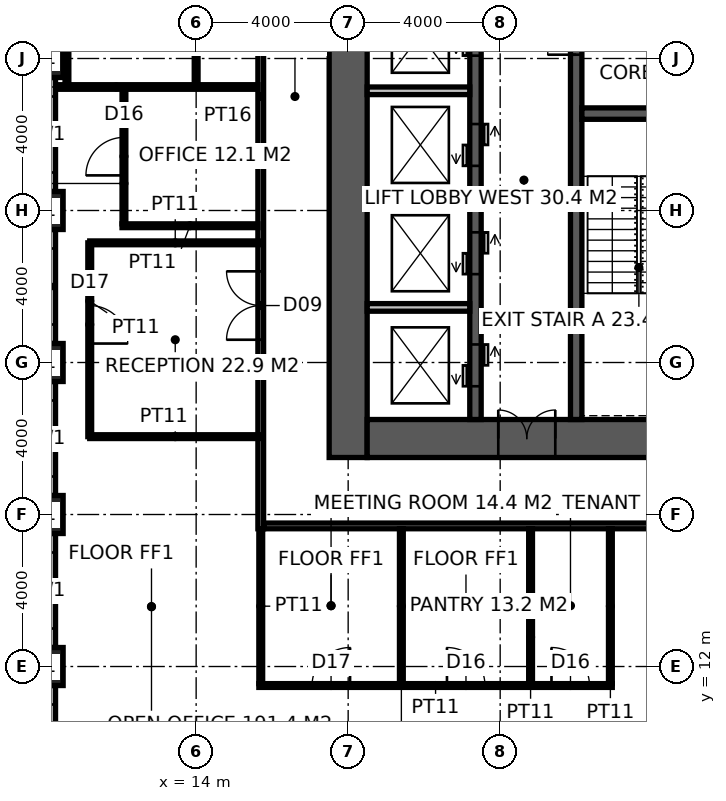
"""IFC4 building model, lengths in metres.
Left out: names, types, materials, properties, quantities, classifications, styles, units other than length and angle.
Written with IfcOpenShell. Run it as: python <this file> out.ifc"""

import sys

from ifc_helpers import new_model, si_unit, direction, frame, frame_2d, origin, origin_2d, place, context, subcontext, project, spatial, rectangle, hollow_rectangle, extrude, element, fill, save


model = new_model("IFC4")
c1 = context("Model", 3, precision=1e-05, world=origin(), true_north=direction((0.0, 1.0)))
c2 = subcontext(c1, "Body", "Model", "MODEL_VIEW")
j1 = project(units=[si_unit("LENGTHUNIT", "METRE"), si_unit("PLANEANGLEUNIT", "RADIAN")], contexts=[c1])
p1 = place(None, origin())
s1 = spatial("IfcSite", under=j1, at=p1, CompositionType="ELEMENT")
p2 = place(p1, origin())
s2 = spatial("IfcBuilding", under=s1, at=p2, CompositionType="ELEMENT")
p3 = place(p2, frame((0.0, 0.0, 121.4)))
s3 = spatial("IfcBuildingStorey", under=s2, at=p3, CompositionType="ELEMENT", Elevation=121.4)
for number, where, z_axis, x_axis in (
    (1, (10.0, 12.0, 0.0), (0.0, 0.0, 1.0), (1.0, 0.0, 0.0)),
    (2, (10.0, 16.0, 0.0), (0.0, 0.0, 1.0), (1.0, 0.0, 0.0)),
    (3, (10.0, 20.0, 0.0), (0.0, 0.0, 1.0), (1.0, 0.0, 0.0)),
    (4, (10.0, 24.0, 0.0), (0.0, 0.0, 1.0), (1.0, 0.0, 0.0)),
    (5, (10.0, 28.0, 0.0), (0.0, 0.0, 1.0), (1.0, 0.0, 0.0)),
):
    element("IfcColumn", number, at=place(p3, frame(where, z_axis=z_axis, x_axis=x_axis)), inside=s3, PredefinedType="COLUMN", context=c2, shape_type="SweptSolid", body=[
        extrude(hollow_rectangle(XDim=1.0, YDim=1.0, WallThickness=0.1, at=origin_2d()), origin(), (0.0, 0.0, 1.0), 4.0),
    ])
p4 = place(p3, frame((18.0, 17.5, -0.15), z_axis=(0.0, 0.0, 1.0), x_axis=(0.0, 1.0, 0.0)))
e6 = element("IfcWall", 6, at=p4, inside=s3, PredefinedType="SHEAR", context=c2, shape_type="SweptSolid", body=[
    extrude(rectangle(XDim=19.0, YDim=1.0, at=frame_2d((9.5, 0.0))), origin(), (0.0, 0.0, 1.0), 4.0),
])
p5 = place(p3, frame((18.5, 18.0, -0.15), z_axis=(0.0, 0.0, 1.0), x_axis=(1.0, 0.0, 0.0)))
e7 = element("IfcWall", 7, at=p5, inside=s3, PredefinedType="SHEAR", context=c2, shape_type="SweptSolid", body=[
    extrude(rectangle(XDim=17.6, YDim=1.0, at=frame_2d((8.8, 0.0))), origin(), (0.0, 0.0, 1.0), 4.0),
])
p6 = place(p5, frame((3.45, 0.0, 0.15)))
e8 = element("IfcOpeningElement", 8, at=p6, cuts=e7, PredefinedType="OPENING", context=c2, shape_type="SweptSolid", body=[
    extrude(rectangle(XDim=1.5, YDim=2.4, at=frame_2d((0.75, 1.2))), frame((0.0, 0.51, 0.0), z_axis=(0.0, -1.0, 0.0), x_axis=(1.0, 0.0, 0.0)), (0.0, 0.0, 1.0), 1.02),
])
p7 = place(p3, frame((24.0, 18.5, -0.15), z_axis=(0.0, 0.0, 1.0), x_axis=(0.0, 1.0, 0.0)))
e9 = element("IfcWall", 9, at=p7, inside=s3, PredefinedType="SHEAR", context=c2, shape_type="SweptSolid", body=[
    extrude(rectangle(XDim=17.0, YDim=0.3, at=frame_2d((8.5, 0.0))), origin(), (0.0, 0.0, 1.0), 4.0),
])
p8 = place(p7, frame((9.6, 0.0, 0.15)))
e10 = element("IfcOpeningElement", 10, at=p8, cuts=e9, PredefinedType="OPENING", context=c2, shape_type="SweptSolid", body=[
    extrude(rectangle(XDim=1.5, YDim=2.4, at=frame_2d((0.75, 1.2))), frame((0.0, 0.16, 0.0), z_axis=(0.0, -1.0, 0.0), x_axis=(1.0, 0.0, 0.0)), (0.0, 0.0, 1.0), 0.32),
])
p9 = place(p3, frame((24.15, 26.55, -0.15), z_axis=(0.0, 0.0, 1.0), x_axis=(1.0, 0.0, 0.0)))
e11 = element("IfcWall", 11, at=p9, inside=s3, PredefinedType="SHEAR", context=c2, shape_type="SweptSolid", body=[
    extrude(rectangle(XDim=11.25, YDim=0.3, at=frame_2d((5.625, 0.0))), origin(), (0.0, 0.0, 1.0), 4.0),
])
p10 = place(p9, frame((9.25, 0.0, 0.15)))
e12 = element("IfcOpeningElement", 12, at=p10, cuts=e11, PredefinedType="OPENING", context=c2, shape_type="SweptSolid", body=[
    extrude(rectangle(XDim=1.0, YDim=2.2, at=frame_2d((0.5, 1.1))), frame((0.0, 0.16, 0.0), z_axis=(0.0, -1.0, 0.0), x_axis=(1.0, 0.0, 0.0)), (0.0, 0.0, 1.0), 0.32),
])
p11 = place(p9, frame((4.9, 0.0, 0.15)))
e13 = element("IfcOpeningElement", 13, at=p11, cuts=e11, PredefinedType="OPENING", context=c2, shape_type="SweptSolid", body=[
    extrude(rectangle(XDim=1.5, YDim=2.4, at=frame_2d((0.75, 1.2))), frame((0.0, 0.16, 0.0), z_axis=(0.0, -1.0, 0.0), x_axis=(1.0, 0.0, 0.0)), (0.0, 0.0, 1.0), 0.32),
])
p12 = place(p3, frame((21.35, 18.5, -0.15), z_axis=(0.0, 0.0, 1.0), x_axis=(0.0, 1.0, 0.0)))
e14 = element("IfcWall", 14, at=p12, inside=s3, PredefinedType="SHEAR", context=c2, shape_type="SweptSolid", body=[
    extrude(rectangle(XDim=12.5, YDim=0.3, at=frame_2d((6.25, 0.0))), origin(), (0.0, 0.0, 1.0), 4.0),
])
p13 = place(p12, frame((0.875, 0.0, 0.15)))
e15 = element("IfcOpeningElement", 15, at=p13, cuts=e14, PredefinedType="OPENING", context=c2, shape_type="SweptSolid", body=[
    extrude(rectangle(XDim=1.1, YDim=2.2, at=frame_2d((0.55, 1.1))), frame((0.0, 0.16, 0.0), z_axis=(0.0, -1.0, 0.0), x_axis=(1.0, 0.0, 0.0)), (0.0, 0.0, 1.0), 0.32),
])
p14 = place(p12, frame((3.825, 0.0, 0.15)))
e16 = element("IfcOpeningElement", 16, at=p14, cuts=e14, PredefinedType="OPENING", context=c2, shape_type="SweptSolid", body=[
    extrude(rectangle(XDim=1.1, YDim=2.2, at=frame_2d((0.55, 1.1))), frame((0.0, 0.16, 0.0), z_axis=(0.0, -1.0, 0.0), x_axis=(1.0, 0.0, 0.0)), (0.0, 0.0, 1.0), 0.32),
])
p15 = place(p12, frame((6.675, 0.0, 0.15)))
e17 = element("IfcOpeningElement", 17, at=p15, cuts=e14, PredefinedType="OPENING", context=c2, shape_type="SweptSolid", body=[
    extrude(rectangle(XDim=1.1, YDim=2.2, at=frame_2d((0.55, 1.1))), frame((0.0, 0.16, 0.0), z_axis=(0.0, -1.0, 0.0), x_axis=(1.0, 0.0, 0.0)), (0.0, 0.0, 1.0), 0.32),
])
p16 = place(p12, frame((9.575, 0.0, 0.15)))
e18 = element("IfcOpeningElement", 18, at=p16, cuts=e14, PredefinedType="OPENING", context=c2, shape_type="SweptSolid", body=[
    extrude(rectangle(XDim=1.1, YDim=2.2, at=frame_2d((0.55, 1.1))), frame((0.0, 0.16, 0.0), z_axis=(0.0, -1.0, 0.0), x_axis=(1.0, 0.0, 0.0)), (0.0, 0.0, 1.0), 0.32),
])
for number, where, z_axis, x_axis in (
    (19, (18.5, 21.45, -0.15), (0.0, 0.0, 1.0), (1.0, 0.0, 0.0)),
    (20, (18.5, 24.3, -0.15), (0.0, 0.0, 1.0), (1.0, 0.0, 0.0)),
    (21, (18.5, 27.15, -0.15), (0.0, 0.0, 1.0), (1.0, 0.0, 0.0)),
):
    element("IfcWall", number, at=place(p3, frame(where, z_axis=z_axis, x_axis=x_axis)), inside=s3, PredefinedType="SOLIDWALL", context=c2, shape_type="SweptSolid", body=[
        extrude(rectangle(XDim=2.7, YDim=0.2, at=frame_2d((1.35, 0.0))), origin(), (0.0, 0.0, 1.0), 4.0),
    ])
p17 = place(p3, frame((15.7, 15.625, 0.0), z_axis=(0.0, 0.0, 1.0), x_axis=(0.0, 1.0, 0.0)))
e22 = element("IfcWall", 22, at=p17, inside=s3, PredefinedType="PARTITIONING", context=c2, shape_type="SweptSolid", body=[
    extrude(rectangle(XDim=22.75, YDim=0.15, at=frame_2d((11.375, 0.0))), origin(), (0.0, 0.0, 1.0), 3.85),
])
p18 = place(p17, frame((4.974, 0.0, 0.0)))
e23 = element("IfcOpeningElement", 23, at=p18, cuts=e22, PredefinedType="OPENING", context=c2, shape_type="SweptSolid", body=[
    extrude(rectangle(XDim=1.8, YDim=2.4, at=frame_2d((0.9, 1.2))), frame((0.0, 0.085, 0.0), z_axis=(0.0, -1.0, 0.0), x_axis=(1.0, 0.0, 0.0)), (0.0, 0.0, 1.0), 0.17),
])
p19 = place(p17, frame((16.226, 0.0, 0.0)))
e24 = element("IfcOpeningElement", 24, at=p19, cuts=e22, PredefinedType="OPENING", context=c2, shape_type="SweptSolid", body=[
    extrude(rectangle(XDim=1.8, YDim=2.4, at=frame_2d((0.9, 1.2))), frame((0.0, 0.085, 0.0), z_axis=(0.0, -1.0, 0.0), x_axis=(1.0, 0.0, 0.0)), (0.0, 0.0, 1.0), 0.17),
])
p20 = place(p3, frame((15.775, 15.7, 0.0), z_axis=(0.0, 0.0, 1.0), x_axis=(1.0, 0.0, 0.0)))
e25 = element("IfcWall", 25, at=p20, inside=s3, PredefinedType="PARTITIONING", context=c2, shape_type="SweptSolid", body=[
    extrude(rectangle(XDim=22.05, YDim=0.15, at=frame_2d((11.025, 0.0))), origin(), (0.0, 0.0, 1.0), 3.85),
])
p21 = place(p3, frame((10.3, 27.25, 0.0), z_axis=(0.0, 0.0, 1.0), x_axis=(1.0, 0.0, 0.0)))
e26 = element("IfcWall", 26, at=p21, inside=s3, PredefinedType="PARTITIONING", context=c2, shape_type="SweptSolid", body=[
    extrude(rectangle(XDim=5.325, YDim=0.12, at=frame_2d((2.663, 0.0))), origin(), (0.0, 0.0, 1.0), 3.85),
])
p22 = place(p3, frame((15.65, 11.5, 0.0), z_axis=(0.0, 0.0, 1.0), x_axis=(1.0, 0.0, 0.0)))
e27 = element("IfcWall", 27, at=p22, inside=s3, PredefinedType="PARTITIONING", context=c2, shape_type="SweptSolid", body=[
    extrude(rectangle(XDim=9.3, YDim=0.1, at=frame_2d((4.65, 0.0))), origin(), (0.0, 0.0, 1.0), 3.85),
])
p23 = place(p22, frame((1.4, 0.0, 0.0)))
e28 = element("IfcOpeningElement", 28, at=p23, cuts=e27, PredefinedType="OPENING", context=c2, shape_type="SweptSolid", body=[
    extrude(rectangle(XDim=1.0, YDim=2.2, at=frame_2d((0.5, 1.1))), frame((0.0, 0.06, 0.0), z_axis=(0.0, -1.0, 0.0), x_axis=(1.0, 0.0, 0.0)), (0.0, 0.0, 1.0), 0.12),
])
p24 = place(p22, frame((4.95, 0.0, 0.0)))
e29 = element("IfcOpeningElement", 29, at=p24, cuts=e27, PredefinedType="OPENING", context=c2, shape_type="SweptSolid", body=[
    extrude(rectangle(XDim=1.0, YDim=2.2, at=frame_2d((0.5, 1.1))), frame((0.0, 0.06, 0.0), z_axis=(0.0, -1.0, 0.0), x_axis=(1.0, 0.0, 0.0)), (0.0, 0.0, 1.0), 0.12),
])
p25 = place(p22, frame((7.7, 0.0, 0.0)))
e30 = element("IfcOpeningElement", 30, at=p25, cuts=e27, PredefinedType="OPENING", context=c2, shape_type="SweptSolid", body=[
    extrude(rectangle(XDim=1.0, YDim=2.2, at=frame_2d((0.5, 1.1))), frame((0.0, 0.06, 0.0), z_axis=(0.0, -1.0, 0.0), x_axis=(1.0, 0.0, 0.0)), (0.0, 0.0, 1.0), 0.12),
])
p26 = place(p3, frame((12.05, 23.599, 0.0), z_axis=(0.0, 0.0, 1.0), x_axis=(1.0, 0.0, 0.0)))
e31 = element("IfcWall", 31, at=p26, inside=s3, PredefinedType="PARTITIONING", context=c2, shape_type="SweptSolid", body=[
    extrude(rectangle(XDim=3.575, YDim=0.1, at=frame_2d((1.788, 0.0))), origin(), (0.0, 0.0, 1.0), 2.95),
])
p27 = place(p3, frame((10.6, 27.31, 0.0), z_axis=(0.0, 0.0, 1.0), x_axis=(0.0, 1.0, 0.0)))
e32 = element("IfcWall", 32, at=p27, inside=s3, PredefinedType="PARTITIONING", context=c2, shape_type="SweptSolid", body=[
    extrude(rectangle(XDim=3.49, YDim=0.1, at=frame_2d((1.745, 0.0))), origin(), (0.0, 0.0, 1.0), 3.85),
])
p28 = place(p3, frame((12.1, 23.649, 0.0), z_axis=(0.0, 0.0, 1.0), x_axis=(0.0, 1.0, 0.0)))
e33 = element("IfcWall", 33, at=p28, inside=s3, PredefinedType="PARTITIONING", context=c2, shape_type="SweptSolid", body=[
    extrude(rectangle(XDim=3.54, YDim=0.1, at=frame_2d((1.77, 0.0))), origin(), (0.0, 0.0, 1.0), 3.85),
])
p29 = place(p28, frame((1.275, 0.0, 0.0)))
e34 = element("IfcOpeningElement", 34, at=p29, cuts=e33, PredefinedType="OPENING", context=c2, shape_type="SweptSolid", body=[
    extrude(rectangle(XDim=1.0, YDim=2.2, at=frame_2d((0.5, 1.1))), frame((0.0, 0.06, 0.0), z_axis=(0.0, -1.0, 0.0), x_axis=(1.0, 0.0, 0.0)), (0.0, 0.0, 1.0), 0.12),
])
p30 = place(p3, frame((14.0, 27.31, 0.0), z_axis=(0.0, 0.0, 1.0), x_axis=(0.0, 1.0, 0.0)))
e35 = element("IfcWall", 35, at=p30, inside=s3, PredefinedType="PARTITIONING", context=c2, shape_type="SweptSolid", body=[
    extrude(rectangle(XDim=3.49, YDim=0.1, at=frame_2d((1.745, 0.0))), origin(), (0.0, 0.0, 1.0), 3.85),
])
for number, where, z_axis, x_axis in (
    (36, (15.7, 11.55, 0.0), (0.0, 0.0, 1.0), (0.0, 1.0, 0.0)),
    (37, (19.4, 11.55, 0.0), (0.0, 0.0, 1.0), (0.0, 1.0, 0.0)),
    (38, (22.8, 11.55, 0.0), (0.0, 0.0, 1.0), (0.0, 1.0, 0.0)),
    (39, (24.9, 11.55, 0.0), (0.0, 0.0, 1.0), (0.0, 1.0, 0.0)),
):
    element("IfcWall", number, at=place(p3, frame(where, z_axis=z_axis, x_axis=x_axis)), inside=s3, PredefinedType="PARTITIONING", context=c2, shape_type="SweptSolid", body=[
        extrude(rectangle(XDim=4.075, YDim=0.1, at=frame_2d((2.038, 0.0))), origin(), (0.0, 0.0, 1.0), 3.85),
    ])
p31 = place(p3, frame((15.7, 23.149, 0.0), z_axis=(0.0, 0.0, 1.0), x_axis=(-1.0, 0.0, 0.0)))
e40 = element("IfcWall", 40, at=p31, inside=s3, PredefinedType="PARTITIONING", context=c2, shape_type="SweptSolid", body=[
    extrude(rectangle(XDim=4.5, YDim=0.1, at=frame_2d((2.25, 0.0))), origin(), (0.0, 0.0, 1.0), 3.85),
])
p32 = place(p3, frame((11.2, 23.149, 0.0), z_axis=(0.0, 0.0, 1.0), x_axis=(0.0, -1.0, 0.0)))
e41 = element("IfcWall", 41, at=p32, inside=s3, PredefinedType="PARTITIONING", context=c2, shape_type="SweptSolid", body=[
    extrude(rectangle(XDim=5.1, YDim=0.1, at=frame_2d((2.55, 0.0))), origin(), (0.0, 0.0, 1.0), 3.85),
])
p33 = place(p32, frame((1.65, 0.0, 0.0)))
e42 = element("IfcOpeningElement", 42, at=p33, cuts=e41, PredefinedType="OPENING", context=c2, shape_type="SweptSolid", body=[
    extrude(rectangle(XDim=1.0, YDim=2.2, at=frame_2d((0.5, 1.1))), frame((0.0, 0.06, 0.0), z_axis=(0.0, -1.0, 0.0), x_axis=(1.0, 0.0, 0.0)), (0.0, 0.0, 1.0), 0.12),
])
p34 = place(p3, frame((11.2, 18.049, 0.0), z_axis=(0.0, 0.0, 1.0), x_axis=(1.0, 0.0, 0.0)))
e43 = element("IfcWall", 43, at=p34, inside=s3, PredefinedType="PARTITIONING", context=c2, shape_type="SweptSolid", body=[
    extrude(rectangle(XDim=4.5, YDim=0.1, at=frame_2d((2.25, 0.0))), origin(), (0.0, 0.0, 1.0), 3.85),
])
p35 = place(p3, frame((10.15, 11.5, 0.0), z_axis=(0.0, 0.0, 1.0), x_axis=(0.0, -1.0, 0.0)))
e44 = element("IfcWall", 44, at=p35, inside=s3, PredefinedType="ELEMENTEDWALL", context=c2, shape_type="SweptSolid", body=[
    extrude(rectangle(XDim=3.0, YDim=0.3, at=frame_2d((1.5, 0.0))), origin(), (0.0, 0.0, 1.0), 2.85),
])
p36 = place(p35, frame((0.5, 0.0, 0.8)))
e45 = element("IfcOpeningElement", 45, at=p36, cuts=e44, PredefinedType="OPENING", context=c2, shape_type="SweptSolid", body=[
    extrude(rectangle(XDim=2.0, YDim=2.0, at=frame_2d((1.0, 1.0))), frame((0.0, 0.16, 0.0), z_axis=(0.0, -1.0, 0.0), x_axis=(1.0, 0.0, 0.0)), (0.0, 0.0, 1.0), 0.32),
])
p37 = place(p3, frame((10.15, 15.5, 0.0), z_axis=(0.0, 0.0, 1.0), x_axis=(0.0, -1.0, 0.0)))
e46 = element("IfcWall", 46, at=p37, inside=s3, PredefinedType="ELEMENTEDWALL", context=c2, shape_type="SweptSolid", body=[
    extrude(rectangle(XDim=3.0, YDim=0.3, at=frame_2d((1.5, 0.0))), origin(), (0.0, 0.0, 1.0), 2.85),
])
p38 = place(p37, frame((0.5, 0.0, 0.8)))
e47 = element("IfcOpeningElement", 47, at=p38, cuts=e46, PredefinedType="OPENING", context=c2, shape_type="SweptSolid", body=[
    extrude(rectangle(XDim=2.0, YDim=2.0, at=frame_2d((1.0, 1.0))), frame((0.0, 0.16, 0.0), z_axis=(0.0, -1.0, 0.0), x_axis=(1.0, 0.0, 0.0)), (0.0, 0.0, 1.0), 0.32),
])
p39 = place(p3, frame((10.15, 19.5, 0.0), z_axis=(0.0, 0.0, 1.0), x_axis=(0.0, -1.0, 0.0)))
e48 = element("IfcWall", 48, at=p39, inside=s3, PredefinedType="ELEMENTEDWALL", context=c2, shape_type="SweptSolid", body=[
    extrude(rectangle(XDim=3.0, YDim=0.3, at=frame_2d((1.5, 0.0))), origin(), (0.0, 0.0, 1.0), 2.85),
])
p40 = place(p39, frame((0.5, 0.0, 0.8)))
e49 = element("IfcOpeningElement", 49, at=p40, cuts=e48, PredefinedType="OPENING", context=c2, shape_type="SweptSolid", body=[
    extrude(rectangle(XDim=2.0, YDim=2.0, at=frame_2d((1.0, 1.0))), frame((0.0, 0.16, 0.0), z_axis=(0.0, -1.0, 0.0), x_axis=(1.0, 0.0, 0.0)), (0.0, 0.0, 1.0), 0.32),
])
p41 = place(p3, frame((10.15, 23.5, 0.0), z_axis=(0.0, 0.0, 1.0), x_axis=(0.0, -1.0, 0.0)))
e50 = element("IfcWall", 50, at=p41, inside=s3, PredefinedType="ELEMENTEDWALL", context=c2, shape_type="SweptSolid", body=[
    extrude(rectangle(XDim=3.0, YDim=0.3, at=frame_2d((1.5, 0.0))), origin(), (0.0, 0.0, 1.0), 2.85),
])
p42 = place(p41, frame((0.5, 0.0, 0.8)))
e51 = element("IfcOpeningElement", 51, at=p42, cuts=e50, PredefinedType="OPENING", context=c2, shape_type="SweptSolid", body=[
    extrude(rectangle(XDim=2.0, YDim=2.0, at=frame_2d((1.0, 1.0))), frame((0.0, 0.16, 0.0), z_axis=(0.0, -1.0, 0.0), x_axis=(1.0, 0.0, 0.0)), (0.0, 0.0, 1.0), 0.32),
])
p43 = place(p3, frame((10.15, 27.5, 0.0), z_axis=(0.0, 0.0, 1.0), x_axis=(0.0, -1.0, 0.0)))
e52 = element("IfcWall", 52, at=p43, inside=s3, PredefinedType="ELEMENTEDWALL", context=c2, shape_type="SweptSolid", body=[
    extrude(rectangle(XDim=3.0, YDim=0.3, at=frame_2d((1.5, 0.0))), origin(), (0.0, 0.0, 1.0), 2.85),
])
p44 = place(p43, frame((0.5, 0.0, 0.8)))
e53 = element("IfcOpeningElement", 53, at=p44, cuts=e52, PredefinedType="OPENING", context=c2, shape_type="SweptSolid", body=[
    extrude(rectangle(XDim=2.0, YDim=2.0, at=frame_2d((1.0, 1.0))), frame((0.0, 0.16, 0.0), z_axis=(0.0, -1.0, 0.0), x_axis=(1.0, 0.0, 0.0)), (0.0, 0.0, 1.0), 0.32),
])
p45 = place(p8, origin())
e54 = element("IfcDoor", 54, at=p45, inside=s3, OperationType="DOUBLE_DOOR_DOUBLE_SWING", PredefinedType="DOOR", context=c2, shape_type="SweptSolid", body=[
    extrude(rectangle(XDim=1.5, YDim=2.4, at=frame_2d((0.75, 1.2))), frame((0.0, 0.025, 0.0), z_axis=(0.0, -1.0, 0.0), x_axis=(1.0, 0.0, 0.0)), (0.0, 0.0, 1.0), 0.05),
])
fill(e10, e54)
p46 = place(p6, origin())
e55 = element("IfcDoor", 55, at=p46, inside=s3, OperationType="DOUBLE_DOOR_DOUBLE_SWING", PredefinedType="DOOR", context=c2, shape_type="SweptSolid", body=[
    extrude(rectangle(XDim=1.5, YDim=2.4, at=frame_2d((0.75, 1.2))), frame((0.0, 0.025, 0.0), z_axis=(0.0, -1.0, 0.0), x_axis=(1.0, 0.0, 0.0)), (0.0, 0.0, 1.0), 0.05),
])
fill(e8, e55)
p47 = place(p18, origin())
e56 = element("IfcDoor", 56, at=p47, inside=s3, OperationType="DOUBLE_DOOR_DOUBLE_SWING", PredefinedType="DOOR", context=c2, shape_type="SweptSolid", body=[
    extrude(rectangle(XDim=1.8, YDim=2.4, at=frame_2d((0.9, 1.2))), frame((0.0, 0.025, 0.0), z_axis=(0.0, -1.0, 0.0), x_axis=(1.0, 0.0, 0.0)), (0.0, 0.0, 1.0), 0.05),
])
fill(e23, e56)
p48 = place(p23, origin())
e57 = element("IfcDoor", 57, at=p48, inside=s3, OperationType="SINGLE_SWING_RIGHT", PredefinedType="DOOR", context=c2, shape_type="SweptSolid", body=[
    extrude(rectangle(XDim=1.0, YDim=2.2, at=frame_2d((0.5, 1.1))), frame((0.0, 0.025, 0.0), z_axis=(0.0, -1.0, 0.0), x_axis=(1.0, 0.0, 0.0)), (0.0, 0.0, 1.0), 0.05),
])
fill(e28, e57)
p49 = place(p24, origin())
e58 = element("IfcDoor", 58, at=p49, inside=s3, OperationType="SINGLE_SWING_LEFT", PredefinedType="DOOR", context=c2, shape_type="SweptSolid", body=[
    extrude(rectangle(XDim=1.0, YDim=2.2, at=frame_2d((0.5, 1.1))), frame((0.0, 0.025, 0.0), z_axis=(0.0, -1.0, 0.0), x_axis=(1.0, 0.0, 0.0)), (0.0, 0.0, 1.0), 0.05),
])
fill(e29, e58)
p50 = place(p25, origin())
e59 = element("IfcDoor", 59, at=p50, inside=s3, OperationType="SINGLE_SWING_LEFT", PredefinedType="DOOR", context=c2, shape_type="SweptSolid", body=[
    extrude(rectangle(XDim=1.0, YDim=2.2, at=frame_2d((0.5, 1.1))), frame((0.0, 0.025, 0.0), z_axis=(0.0, -1.0, 0.0), x_axis=(1.0, 0.0, 0.0)), (0.0, 0.0, 1.0), 0.05),
])
fill(e30, e59)
p51 = place(p29, origin())
e60 = element("IfcDoor", 60, at=p51, inside=s3, OperationType="SINGLE_SWING_LEFT", PredefinedType="DOOR", context=c2, shape_type="SweptSolid", body=[
    extrude(rectangle(XDim=1.0, YDim=2.2, at=frame_2d((0.5, 1.1))), frame((0.0, 0.025, 0.0), z_axis=(0.0, -1.0, 0.0), x_axis=(1.0, 0.0, 0.0)), (0.0, 0.0, 1.0), 0.05),
])
fill(e34, e60)
p52 = place(p33, origin())
e61 = element("IfcDoor", 61, at=p52, inside=s3, OperationType="SINGLE_SWING_RIGHT", PredefinedType="DOOR", context=c2, shape_type="SweptSolid", body=[
    extrude(rectangle(XDim=1.0, YDim=2.2, at=frame_2d((0.5, 1.1))), frame((0.0, 0.025, 0.0), z_axis=(0.0, -1.0, 0.0), x_axis=(1.0, 0.0, 0.0)), (0.0, 0.0, 1.0), 0.05),
])
fill(e42, e61)
p53 = place(p13, origin())
e62 = element("IfcDoor", 62, at=p53, inside=s3, OperationType="DOUBLE_DOOR_SLIDING", PredefinedType="DOOR", context=c2, shape_type="SweptSolid", body=[
    extrude(rectangle(XDim=1.1, YDim=2.2, at=frame_2d((0.55, 1.1))), frame((0.0, 0.025, 0.0), z_axis=(0.0, -1.0, 0.0), x_axis=(1.0, 0.0, 0.0)), (0.0, 0.0, 1.0), 0.05),
])
fill(e15, e62)
p54 = place(p14, origin())
e63 = element("IfcDoor", 63, at=p54, inside=s3, OperationType="DOUBLE_DOOR_SLIDING", PredefinedType="DOOR", context=c2, shape_type="SweptSolid", body=[
    extrude(rectangle(XDim=1.1, YDim=2.2, at=frame_2d((0.55, 1.1))), frame((0.0, 0.025, 0.0), z_axis=(0.0, -1.0, 0.0), x_axis=(1.0, 0.0, 0.0)), (0.0, 0.0, 1.0), 0.05),
])
fill(e16, e63)
p55 = place(p15, origin())
e64 = element("IfcDoor", 64, at=p55, inside=s3, OperationType="DOUBLE_DOOR_SLIDING", PredefinedType="DOOR", context=c2, shape_type="SweptSolid", body=[
    extrude(rectangle(XDim=1.1, YDim=2.2, at=frame_2d((0.55, 1.1))), frame((0.0, 0.025, 0.0), z_axis=(0.0, -1.0, 0.0), x_axis=(1.0, 0.0, 0.0)), (0.0, 0.0, 1.0), 0.05),
])
fill(e17, e64)
p56 = place(p16, origin())
e65 = element("IfcDoor", 65, at=p56, inside=s3, OperationType="DOUBLE_DOOR_SLIDING", PredefinedType="DOOR", context=c2, shape_type="SweptSolid", body=[
    extrude(rectangle(XDim=1.1, YDim=2.2, at=frame_2d((0.55, 1.1))), frame((0.0, 0.025, 0.0), z_axis=(0.0, -1.0, 0.0), x_axis=(1.0, 0.0, 0.0)), (0.0, 0.0, 1.0), 0.05),
])
fill(e18, e65)
save(model, sys.argv[1])
